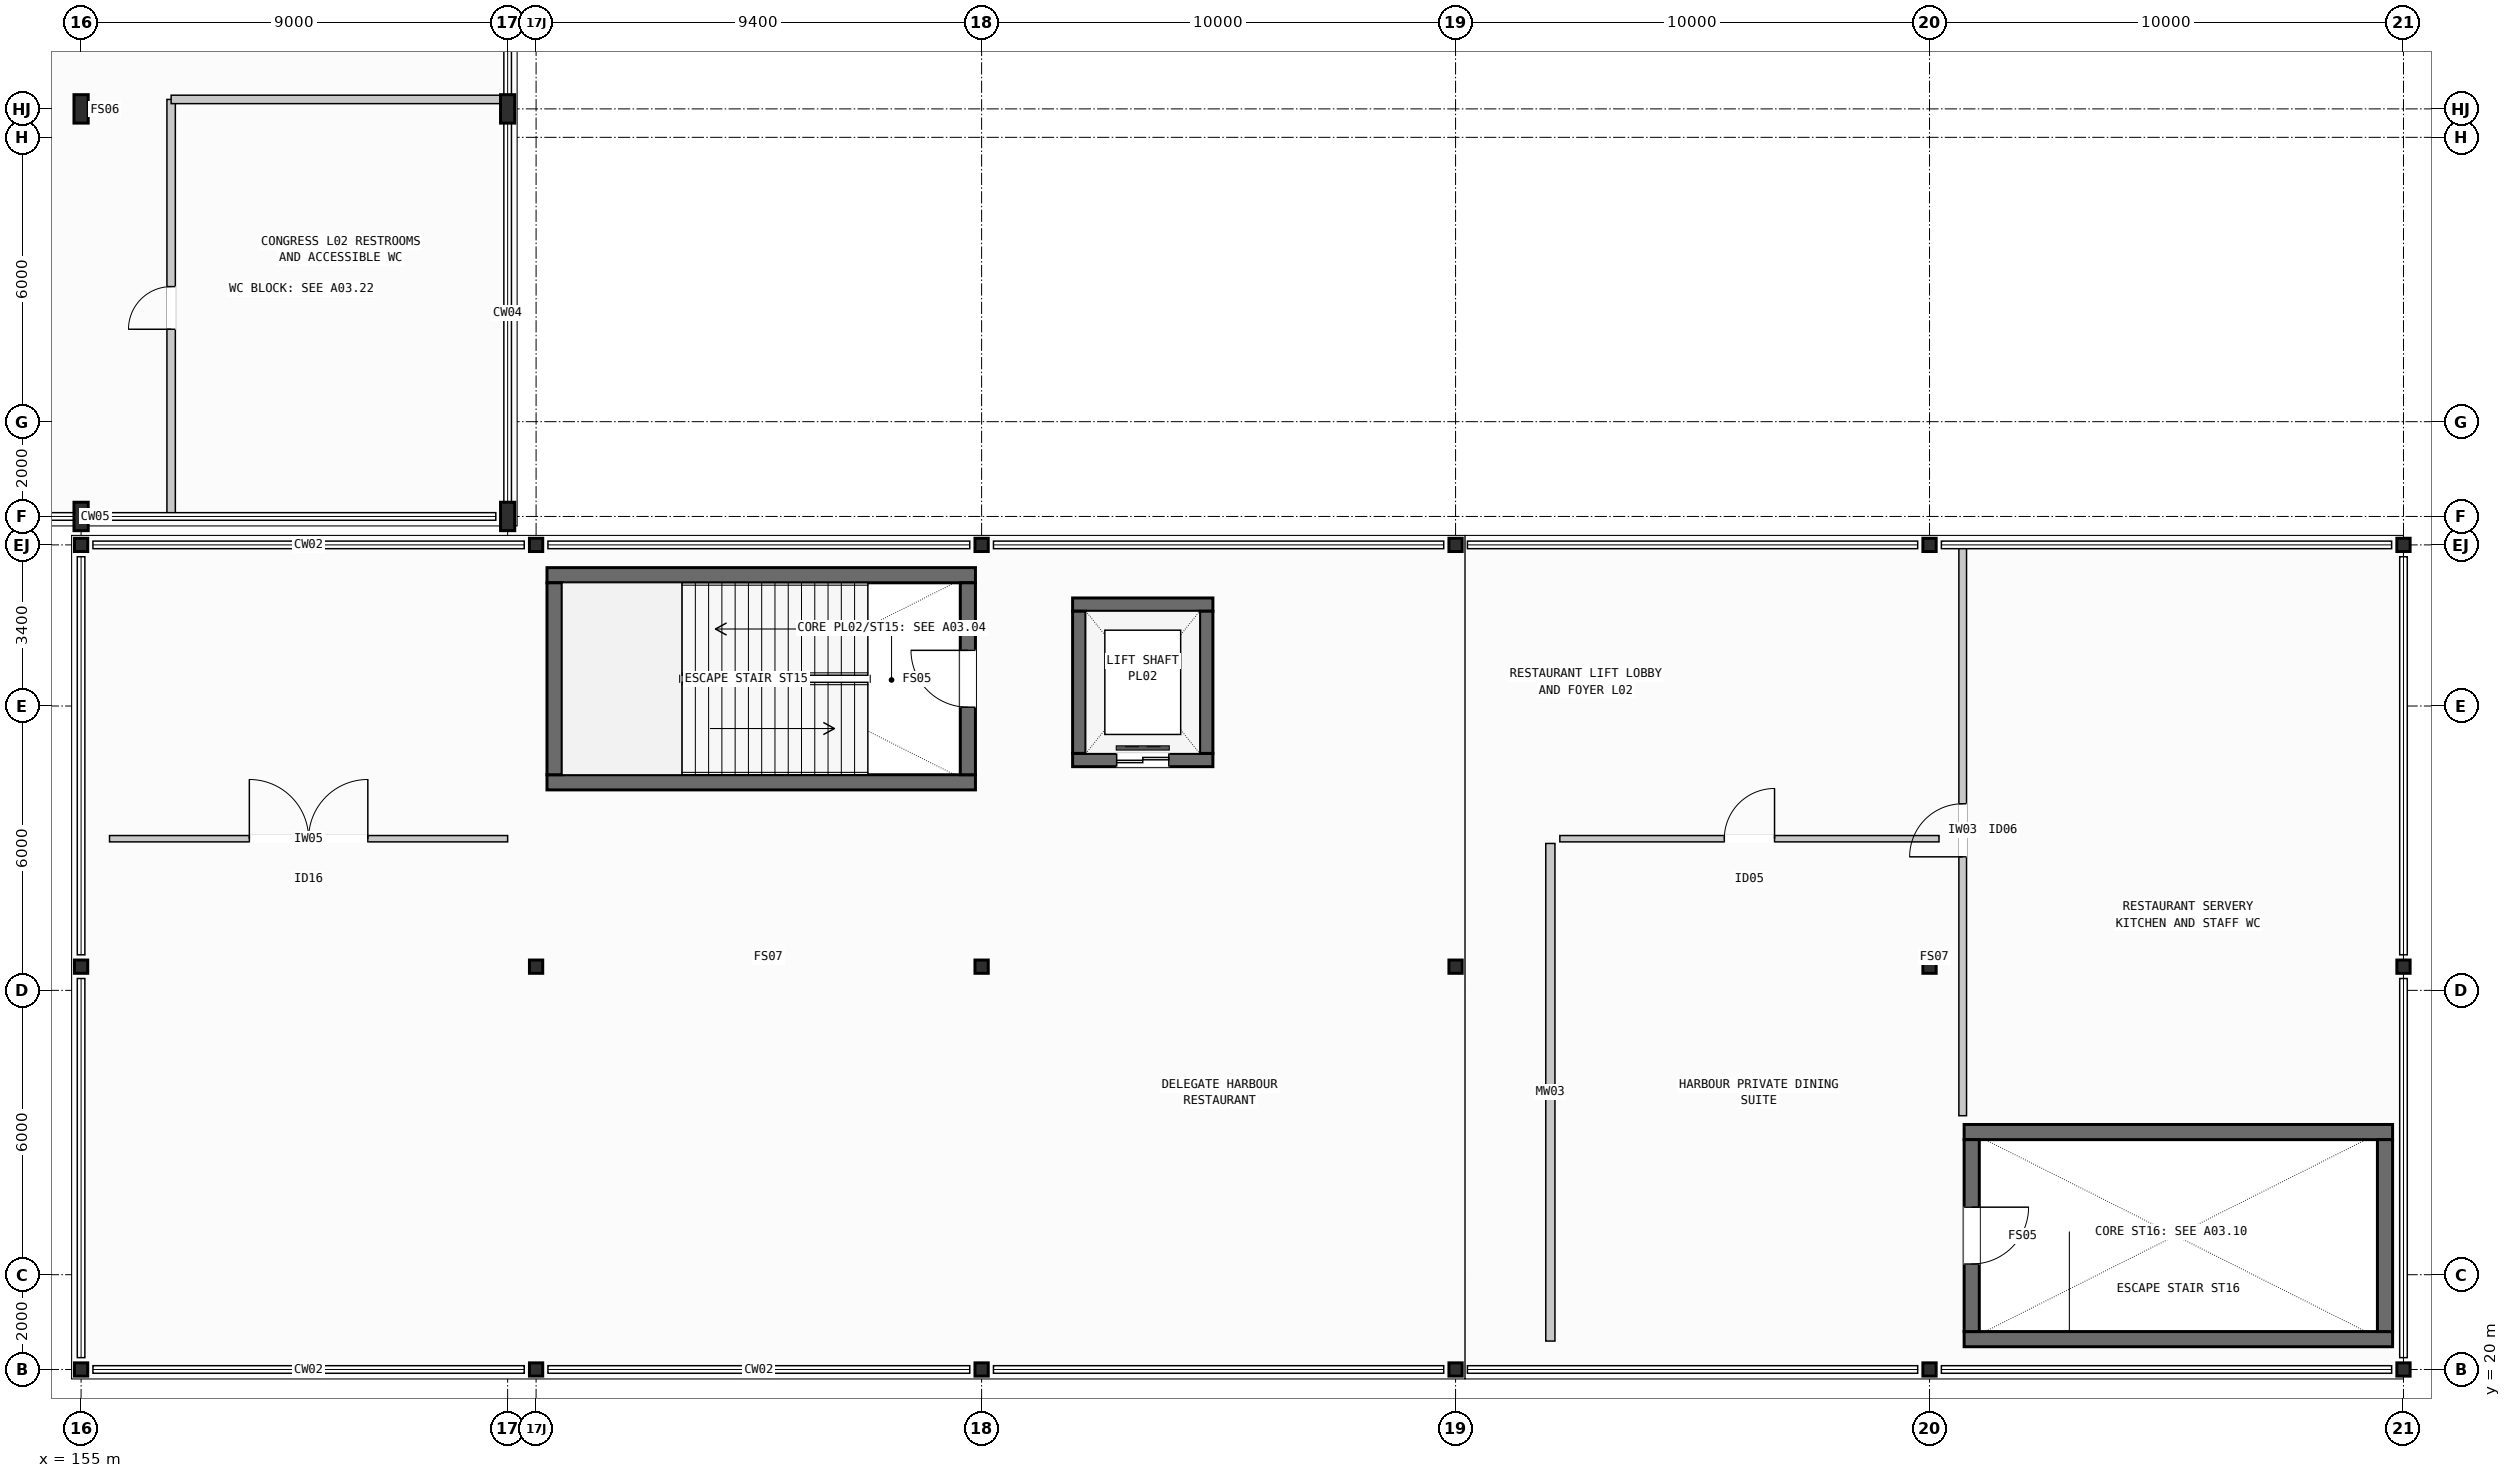
"""IFC4 building model, lengths in metres.
Left out: names, types, materials, properties, quantities, classifications, styles, units other than length and angle.
Written with IfcOpenShell. Run it as: python <this file> out.ifc"""

import sys

from ifc_helpers import new_model, si_unit, direction, frame, frame_2d, origin, origin_2d, place, context, subcontext, project, spatial, rectangle, i_section, extrude, element, fill, save


model = new_model("IFC4")
c1 = context("Model", 3, precision=1e-05, world=origin(), true_north=direction((0.0, 1.0)))
c2 = subcontext(c1, "Body", "Model", "MODEL_VIEW")
j1 = project(units=[si_unit("LENGTHUNIT", "METRE"), si_unit("PLANEANGLEUNIT", "RADIAN")], contexts=[c1])
p1 = place(None, origin())
s1 = spatial("IfcSite", under=j1, at=p1, CompositionType="ELEMENT")
p2 = place(p1, origin())
s2 = spatial("IfcBuilding", under=s1, at=p2, CompositionType="ELEMENT")
p3 = place(p2, frame((0.0, 0.0, 11.4)))
s3 = spatial("IfcBuildingStorey", under=s2, at=p3, CompositionType="ELEMENT", Elevation=11.4)
for number, where, z_axis, x_axis in (
    (1, (155.0, 20.0, 0.0), (0.0, 0.0, 1.0), (1.0, 0.0, 0.0)),
    (2, (155.0, 28.5, 0.0), (0.0, 0.0, 1.0), (1.0, 0.0, 0.0)),
    (3, (155.0, 37.4, 0.0), (0.0, 0.0, 1.0), (1.0, 0.0, 0.0)),
):
    element("IfcColumn", number, at=place(p3, frame(where, z_axis=z_axis, x_axis=x_axis)), inside=s3, PredefinedType="COLUMN", context=c2, shape_type="SweptSolid", body=[
        extrude(i_section(OverallWidth=0.28, OverallDepth=0.28, WebThickness=0.01, FlangeThickness=0.018, FilletRadius=0.024, at=origin_2d()), origin(), (0.0, 0.0, 1.0), 5.4),
    ])
for number, where, z_axis, x_axis in (
    (4, (155.0, 38.0, 0.0), (0.0, 0.0, 1.0), (1.0, 0.0, 0.0)),
    (5, (155.0, 46.6, 0.0), (0.0, 0.0, 1.0), (1.0, 0.0, 0.0)),
    (6, (164.0, 38.0, 0.0), (0.0, 0.0, 1.0), (1.0, 0.0, 0.0)),
    (7, (164.0, 46.6, 0.0), (0.0, 0.0, 1.0), (1.0, 0.0, 0.0)),
):
    element("IfcColumn", number, at=place(p3, frame(where, z_axis=z_axis, x_axis=x_axis)), inside=s3, PredefinedType="COLUMN", context=c2, shape_type="SweptSolid", body=[
        extrude(i_section(OverallWidth=0.3, OverallDepth=0.6, WebThickness=0.015, FlangeThickness=0.03, FilletRadius=0.027, at=origin_2d()), origin(), (0.0, 0.0, 1.0), 5.4),
    ])
for number, where, z_axis, x_axis in (
    (8, (164.6, 20.0, 0.0), (0.0, 0.0, 1.0), (1.0, 0.0, 0.0)),
    (9, (164.6, 28.5, 0.0), (0.0, 0.0, 1.0), (1.0, 0.0, 0.0)),
    (10, (164.6, 37.4, 0.0), (0.0, 0.0, 1.0), (1.0, 0.0, 0.0)),
    (11, (174.0, 20.0, 0.0), (0.0, 0.0, 1.0), (1.0, 0.0, 0.0)),
    (12, (174.0, 28.5, 0.0), (0.0, 0.0, 1.0), (1.0, 0.0, 0.0)),
    (13, (174.0, 37.4, 0.0), (0.0, 0.0, 1.0), (1.0, 0.0, 0.0)),
    (14, (184.0, 20.0, 0.0), (0.0, 0.0, 1.0), (1.0, 0.0, 0.0)),
    (15, (184.0, 28.5, 0.0), (0.0, 0.0, 1.0), (1.0, 0.0, 0.0)),
    (16, (184.0, 37.4, 0.0), (0.0, 0.0, 1.0), (1.0, 0.0, 0.0)),
    (17, (194.0, 20.0, 0.0), (0.0, 0.0, 1.0), (1.0, 0.0, 0.0)),
    (18, (194.0, 28.5, 0.0), (0.0, 0.0, 1.0), (1.0, 0.0, 0.0)),
    (19, (194.0, 37.4, 0.0), (0.0, 0.0, 1.0), (1.0, 0.0, 0.0)),
    (20, (204.0, 20.0, 0.0), (0.0, 0.0, 1.0), (1.0, 0.0, 0.0)),
    (21, (204.0, 28.5, 0.0), (0.0, 0.0, 1.0), (1.0, 0.0, 0.0)),
    (22, (204.0, 37.4, 0.0), (0.0, 0.0, 1.0), (1.0, 0.0, 0.0)),
):
    element("IfcColumn", number, at=place(p3, frame(where, z_axis=z_axis, x_axis=x_axis)), inside=s3, PredefinedType="COLUMN", context=c2, shape_type="SweptSolid", body=[
        extrude(i_section(OverallWidth=0.28, OverallDepth=0.28, WebThickness=0.01, FlangeThickness=0.018, FilletRadius=0.024, at=origin_2d()), origin(), (0.0, 0.0, 1.0), 5.4),
    ])
for number, where, z_axis, x_axis in (
    (23, (164.83, 32.39, 0.0), (0.0, 0.0, 1.0), (1.0, 0.0, 0.0)),
    (24, (164.83, 36.76, 0.0), (0.0, 0.0, 1.0), (1.0, 0.0, 0.0)),
):
    element("IfcWall", number, at=place(p3, frame(where, z_axis=z_axis, x_axis=x_axis)), inside=s3, PredefinedType="SHEAR", context=c2, shape_type="SweptSolid", body=[
        extrude(rectangle(XDim=9.04, YDim=0.32, at=frame_2d((4.52, 0.0))), origin(), (0.0, 0.0, 1.0), 5.4),
    ])
p4 = place(p3, frame((164.99, 32.55, 0.0), z_axis=(0.0, 0.0, 1.0), x_axis=(0.0, 1.0, 0.0)))
e25 = element("IfcWall", 25, at=p4, inside=s3, PredefinedType="SHEAR", context=c2, shape_type="SweptSolid", body=[
    extrude(rectangle(XDim=4.05, YDim=0.32, at=frame_2d((2.025, 0.0))), origin(), (0.0, 0.0, 1.0), 5.4),
])
p5 = place(p3, frame((173.71, 32.55, 0.0), z_axis=(0.0, 0.0, 1.0), x_axis=(0.0, 1.0, 0.0)))
e26 = element("IfcWall", 26, at=p5, inside=s3, PredefinedType="SHEAR", context=c2, shape_type="SweptSolid", body=[
    extrude(rectangle(XDim=4.05, YDim=0.32, at=frame_2d((2.025, 0.0))), origin(), (0.0, 0.0, 1.0), 5.4),
])
p6 = place(p5, frame((1.425, 0.0, 0.0)))
e27 = element("IfcOpeningElement", 27, at=p6, cuts=e26, PredefinedType="OPENING", context=c2, shape_type="SweptSolid", body=[
    extrude(rectangle(XDim=1.2, YDim=2.2, at=frame_2d((0.6, 1.1))), frame((0.0, 0.17, 0.0), z_axis=(0.0, -1.0, 0.0), x_axis=(1.0, 0.0, 0.0)), (0.0, 0.0, 1.0), 0.34),
])
for number, where, z_axis, x_axis in (
    (28, (194.73, 20.64, 0.0), (0.0, 0.0, 1.0), (1.0, 0.0, 0.0)),
    (29, (194.73, 25.01, 0.0), (0.0, 0.0, 1.0), (1.0, 0.0, 0.0)),
):
    element("IfcWall", number, at=place(p3, frame(where, z_axis=z_axis, x_axis=x_axis)), inside=s3, PredefinedType="SHEAR", context=c2, shape_type="SweptSolid", body=[
        extrude(rectangle(XDim=9.04, YDim=0.32, at=frame_2d((4.52, 0.0))), origin(), (0.0, 0.0, 1.0), 4.2),
    ])
p7 = place(p3, frame((194.89, 20.8, 0.0), z_axis=(0.0, 0.0, 1.0), x_axis=(0.0, 1.0, 0.0)))
e30 = element("IfcWall", 30, at=p7, inside=s3, PredefinedType="SHEAR", context=c2, shape_type="SweptSolid", body=[
    extrude(rectangle(XDim=4.05, YDim=0.32, at=frame_2d((2.025, 0.0))), origin(), (0.0, 0.0, 1.0), 4.2),
])
p8 = place(p7, frame((1.425, 0.0, 0.0)))
e31 = element("IfcOpeningElement", 31, at=p8, cuts=e30, PredefinedType="OPENING", context=c2, shape_type="SweptSolid", body=[
    extrude(rectangle(XDim=1.2, YDim=2.2, at=frame_2d((0.6, 1.1))), frame((0.0, 0.17, 0.0), z_axis=(0.0, -1.0, 0.0), x_axis=(1.0, 0.0, 0.0)), (0.0, 0.0, 1.0), 0.34),
])
p9 = place(p3, frame((203.61, 20.8, 0.0), z_axis=(0.0, 0.0, 1.0), x_axis=(0.0, 1.0, 0.0)))
e32 = element("IfcWall", 32, at=p9, inside=s3, PredefinedType="SHEAR", context=c2, shape_type="SweptSolid", body=[
    extrude(rectangle(XDim=4.05, YDim=0.32, at=frame_2d((2.025, 0.0))), origin(), (0.0, 0.0, 1.0), 4.2),
])
p10 = place(p3, frame((175.92, 32.86, 0.0), z_axis=(0.0, 0.0, 1.0), x_axis=(1.0, 0.0, 0.0)))
e33 = element("IfcWall", 33, at=p10, inside=s3, PredefinedType="SHEAR", context=c2, shape_type="SweptSolid", body=[
    extrude(rectangle(XDim=2.96, YDim=0.28, at=frame_2d((1.48, 0.0))), origin(), (0.0, 0.0, 1.0), 5.4),
])
p11 = place(p10, frame((0.93, 0.0, 0.0)))
e34 = element("IfcOpeningElement", 34, at=p11, cuts=e33, PredefinedType="OPENING", context=c2, shape_type="SweptSolid", body=[
    extrude(rectangle(XDim=1.1, YDim=2.15, at=frame_2d((0.55, 1.075))), frame((0.0, 0.15, 0.0), z_axis=(0.0, -1.0, 0.0), x_axis=(1.0, 0.0, 0.0)), (0.0, 0.0, 1.0), 0.3),
])
p12 = place(p3, frame((175.92, 36.14, 0.0), z_axis=(0.0, 0.0, 1.0), x_axis=(1.0, 0.0, 0.0)))
e35 = element("IfcWall", 35, at=p12, inside=s3, PredefinedType="SHEAR", context=c2, shape_type="SweptSolid", body=[
    extrude(rectangle(XDim=2.96, YDim=0.28, at=frame_2d((1.48, 0.0))), origin(), (0.0, 0.0, 1.0), 5.4),
])
for number, where, z_axis, x_axis in (
    (36, (176.06, 33.0, 0.0), (0.0, 0.0, 1.0), (0.0, 1.0, 0.0)),
    (37, (178.74, 33.0, 0.0), (0.0, 0.0, 1.0), (0.0, 1.0, 0.0)),
):
    element("IfcWall", number, at=place(p3, frame(where, z_axis=z_axis, x_axis=x_axis)), inside=s3, PredefinedType="SHEAR", context=c2, shape_type="SweptSolid", body=[
        extrude(rectangle(XDim=3.0, YDim=0.28, at=frame_2d((1.5, 0.0))), origin(), (0.0, 0.0, 1.0), 5.4),
    ])
p13 = place(p3, frame((156.9, 38.0, 0.0), z_axis=(0.0, 0.0, 1.0), x_axis=(0.0, 1.0, 0.0)))
e38 = element("IfcWall", 38, at=p13, inside=s3, PredefinedType="PARTITIONING", context=c2, shape_type="SweptSolid", body=[
    extrude(rectangle(XDim=8.8, YDim=0.178, at=frame_2d((4.4, 0.0))), origin(), (0.0, 0.0, 1.0), 4.4),
])
p14 = place(p13, frame((3.95, 0.0, 0.0)))
e39 = element("IfcOpeningElement", 39, at=p14, cuts=e38, PredefinedType="OPENING", context=c2, shape_type="SweptSolid", body=[
    extrude(rectangle(XDim=0.9, YDim=2.08, at=frame_2d((0.45, 1.04))), frame((0.0, 0.099, 0.0), z_axis=(0.0, -1.0, 0.0), x_axis=(1.0, 0.0, 0.0)), (0.0, 0.0, 1.0), 0.198),
])
p15 = place(p3, frame((156.9, 46.8, 0.0), z_axis=(0.0, 0.0, 1.0), x_axis=(1.0, 0.0, 0.0)))
e40 = element("IfcWall", 40, at=p15, inside=s3, PredefinedType="PARTITIONING", context=c2, shape_type="SweptSolid", body=[
    extrude(rectangle(XDim=7.1, YDim=0.178, at=frame_2d((3.55, 0.0))), origin(), (0.0, 0.0, 1.0), 4.4),
])
p16 = place(p3, frame((155.6, 31.2, 0.0), z_axis=(0.0, 0.0, 1.0), x_axis=(1.0, 0.0, 0.0)))
e41 = element("IfcWall", 41, at=p16, inside=s3, PredefinedType="PARTITIONING", context=c2, shape_type="SweptSolid", body=[
    extrude(rectangle(XDim=8.4, YDim=0.134, at=frame_2d((4.2, 0.0))), origin(), (0.0, 0.0, 1.0), 4.4),
])
p17 = place(p16, frame((2.95, 0.0, 0.0)))
e42 = element("IfcOpeningElement", 42, at=p17, cuts=e41, PredefinedType="OPENING", context=c2, shape_type="SweptSolid", body=[
    extrude(rectangle(XDim=2.5, YDim=2.42, at=frame_2d((1.25, 1.21))), frame((0.0, 0.077, 0.0), z_axis=(0.0, -1.0, 0.0), x_axis=(1.0, 0.0, 0.0)), (0.0, 0.0, 1.0), 0.154),
])
p18 = place(p3, frame((186.2, 31.2, 0.0), z_axis=(0.0, 0.0, 1.0), x_axis=(1.0, 0.0, 0.0)))
e43 = element("IfcWall", 43, at=p18, inside=s3, PredefinedType="PARTITIONING", context=c2, shape_type="SweptSolid", body=[
    extrude(rectangle(XDim=8.0, YDim=0.134, at=frame_2d((4.0, 0.0))), origin(), (0.0, 0.0, 1.0), 4.4),
])
p19 = place(p18, frame((3.47, 0.0, 0.0)))
e44 = element("IfcOpeningElement", 44, at=p19, cuts=e43, PredefinedType="OPENING", context=c2, shape_type="SweptSolid", body=[
    extrude(rectangle(XDim=1.06, YDim=2.18, at=frame_2d((0.53, 1.09))), frame((0.0, 0.077, 0.0), z_axis=(0.0, -1.0, 0.0), x_axis=(1.0, 0.0, 0.0)), (0.0, 0.0, 1.0), 0.154),
])
p20 = place(p3, frame((186.0, 20.6, 0.0), z_axis=(0.0, 0.0, 1.0), x_axis=(0.0, 1.0, 0.0)))
e45 = element("IfcWall", 45, at=p20, inside=s3, PredefinedType="MOVABLE", context=c2, shape_type="SweptSolid", body=[
    extrude(rectangle(XDim=10.5, YDim=0.194, at=frame_2d((5.25, 0.0))), origin(), (0.0, 0.0, 1.0), 4.4),
])
p21 = place(p3, frame((194.7, 25.355, 0.0), z_axis=(0.0, 0.0, 1.0), x_axis=(0.0, 1.0, 0.0)))
e46 = element("IfcWall", 46, at=p21, inside=s3, PredefinedType="PARTITIONING", context=c2, shape_type="SweptSolid", body=[
    extrude(rectangle(XDim=12.045, YDim=0.162, at=frame_2d((6.022, 0.0))), origin(), (0.0, 0.0, 1.0), 4.4),
])
p22 = place(p21, frame((5.462, 0.0, 0.0)))
e47 = element("IfcOpeningElement", 47, at=p22, cuts=e46, PredefinedType="OPENING", context=c2, shape_type="SweptSolid", body=[
    extrude(rectangle(XDim=1.12, YDim=2.22, at=frame_2d((0.56, 1.11))), frame((0.0, 0.091, 0.0), z_axis=(0.0, -1.0, 0.0), x_axis=(1.0, 0.0, 0.0)), (0.0, 0.0, 1.0), 0.182),
])
p23 = place(p6, origin())
e48 = element("IfcDoor", 48, at=p23, inside=s3, OperationType="SINGLE_SWING_RIGHT", PredefinedType="DOOR", context=c2, shape_type="SweptSolid", body=[
    extrude(rectangle(XDim=1.2, YDim=2.2, at=frame_2d((0.6, 1.1))), frame((0.0, 0.025, 0.0), z_axis=(0.0, -1.0, 0.0), x_axis=(1.0, 0.0, 0.0)), (0.0, 0.0, 1.0), 0.05),
])
fill(e27, e48)
p24 = place(p8, frame((1.2, 0.0, 0.0), z_axis=(0.0, 0.0, 1.0), x_axis=(-1.0, 0.0, 0.0)))
e49 = element("IfcDoor", 49, at=p24, inside=s3, OperationType="SINGLE_SWING_LEFT", PredefinedType="DOOR", context=c2, shape_type="SweptSolid", body=[
    extrude(rectangle(XDim=1.2, YDim=2.2, at=frame_2d((0.6, 1.1))), frame((0.0, 0.025, 0.0), z_axis=(0.0, -1.0, 0.0), x_axis=(1.0, 0.0, 0.0)), (0.0, 0.0, 1.0), 0.05),
])
fill(e31, e49)
p25 = place(p11, origin())
e50 = element("IfcDoor", 50, at=p25, inside=s3, OperationType="DOUBLE_DOOR_SLIDING", PredefinedType="DOOR", context=c2, shape_type="SweptSolid", body=[
    extrude(rectangle(XDim=1.1, YDim=2.15, at=frame_2d((0.55, 1.075))), frame((0.0, 0.025, 0.0), z_axis=(0.0, -1.0, 0.0), x_axis=(1.0, 0.0, 0.0)), (0.0, 0.0, 1.0), 0.05),
])
fill(e34, e50)
p26 = place(p14, origin())
e51 = element("IfcDoor", 51, at=p26, inside=s3, OperationType="SINGLE_SWING_LEFT", PredefinedType="DOOR", context=c2, shape_type="SweptSolid", body=[
    extrude(rectangle(XDim=0.9, YDim=2.08, at=frame_2d((0.45, 1.04))), frame((0.0, 0.025, 0.0), z_axis=(0.0, -1.0, 0.0), x_axis=(1.0, 0.0, 0.0)), (0.0, 0.0, 1.0), 0.05),
])
fill(e39, e51)
p27 = place(p17, origin())
e52 = element("IfcDoor", 52, at=p27, inside=s3, OperationType="DOUBLE_DOOR_SINGLE_SWING", PredefinedType="DOOR", context=c2, shape_type="SweptSolid", body=[
    extrude(rectangle(XDim=2.5, YDim=2.42, at=frame_2d((1.25, 1.21))), frame((0.0, 0.025, 0.0), z_axis=(0.0, -1.0, 0.0), x_axis=(1.0, 0.0, 0.0)), (0.0, 0.0, 1.0), 0.05),
])
fill(e42, e52)
p28 = place(p19, origin())
e53 = element("IfcDoor", 53, at=p28, inside=s3, OperationType="SINGLE_SWING_RIGHT", PredefinedType="DOOR", context=c2, shape_type="SweptSolid", body=[
    extrude(rectangle(XDim=1.06, YDim=2.18, at=frame_2d((0.53, 1.09))), frame((0.0, 0.025, 0.0), z_axis=(0.0, -1.0, 0.0), x_axis=(1.0, 0.0, 0.0)), (0.0, 0.0, 1.0), 0.05),
])
fill(e44, e53)
p29 = place(p22, origin())
e54 = element("IfcDoor", 54, at=p29, inside=s3, OperationType="SINGLE_SWING_LEFT", PredefinedType="DOOR", context=c2, shape_type="SweptSolid", body=[
    extrude(rectangle(XDim=1.12, YDim=2.22, at=frame_2d((0.56, 1.11))), frame((0.0, 0.025, 0.0), z_axis=(0.0, -1.0, 0.0), x_axis=(1.0, 0.0, 0.0)), (0.0, 0.0, 1.0), 0.05),
])
fill(e47, e54)
save(model, sys.argv[1])
